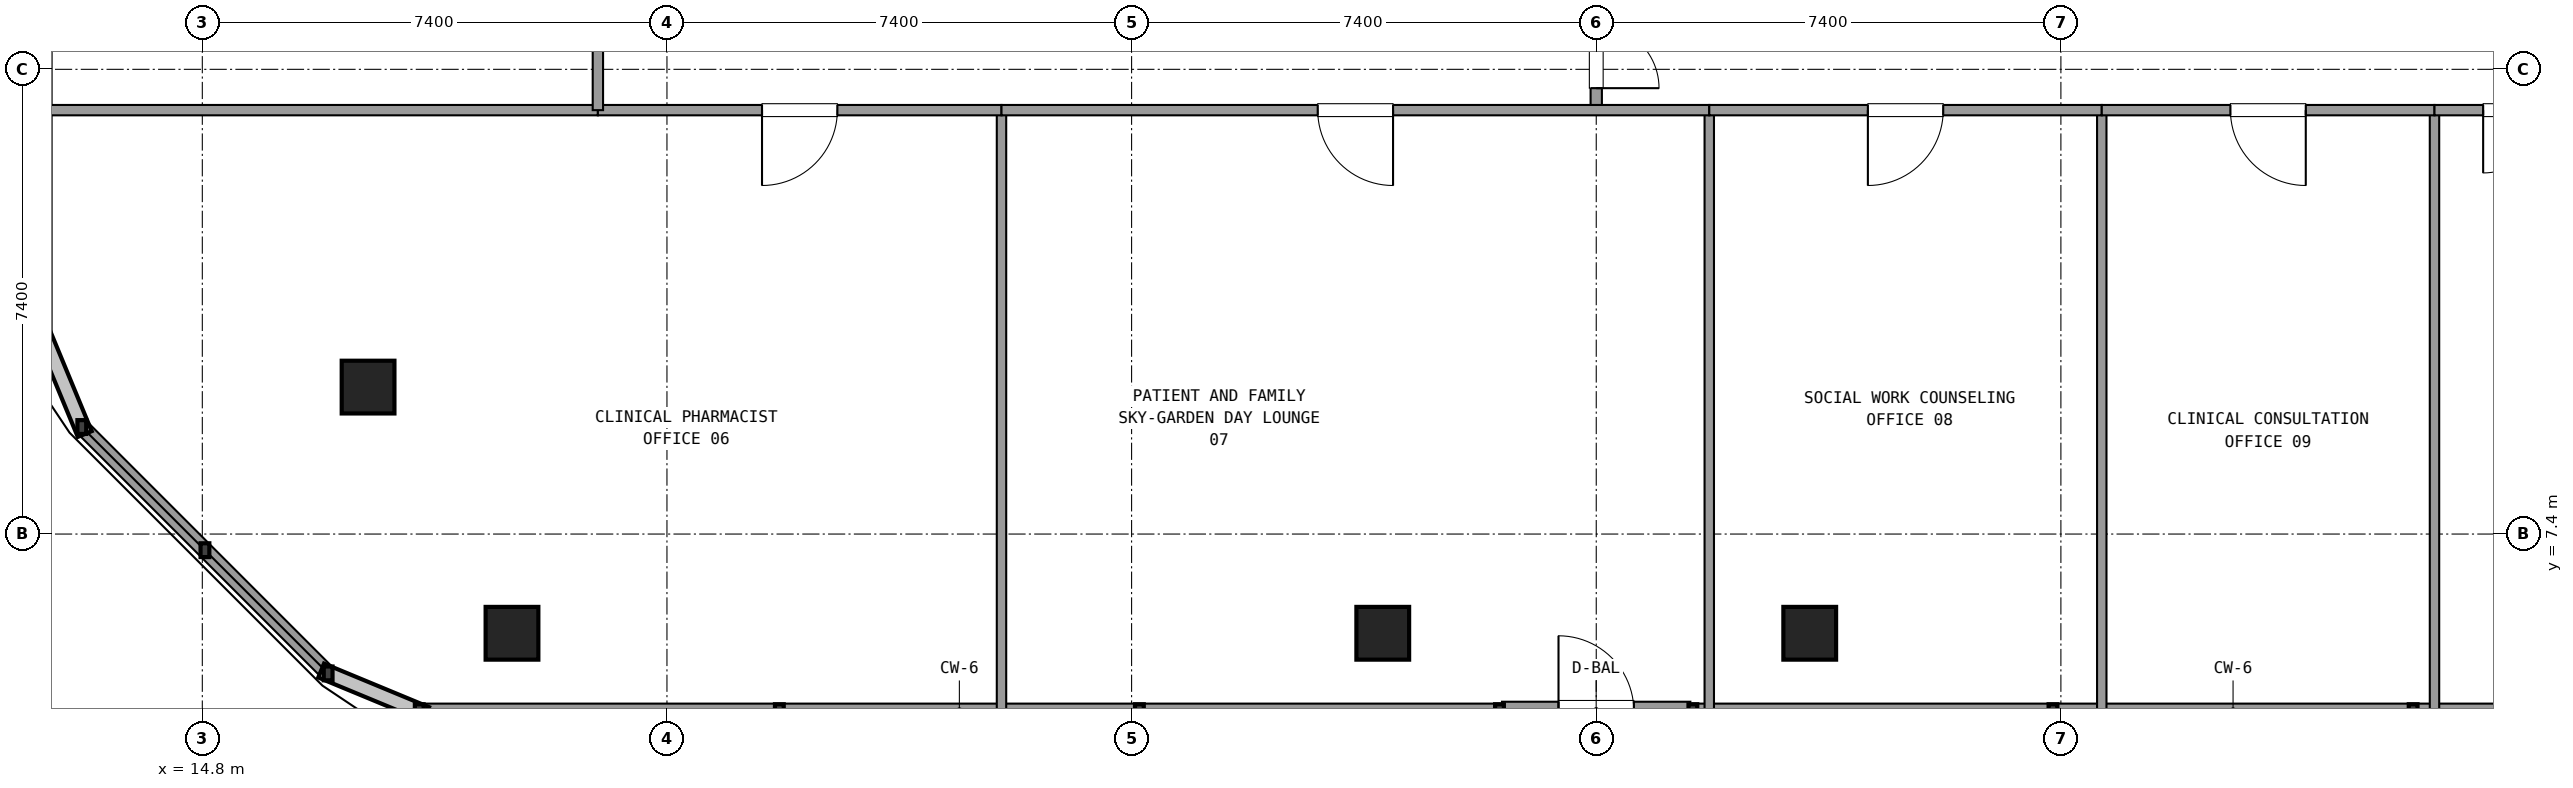
"""IFC4 building model, lengths in metres.
Left out: names, types, materials, properties, quantities, classifications, styles, units other than length and angle.
Written with IfcOpenShell. Run it as: python <this file> out.ifc"""

import sys

from ifc_helpers import new_model, si_unit, direction, frame, frame_2d, origin, origin_2d, place, context, subcontext, project, spatial, rectangle, extrude, element, fill, save


model = new_model("IFC4")
c1 = context("Model", 3, precision=1e-05, world=origin(), true_north=direction((0.0, 1.0)))
c2 = subcontext(c1, "Body", "Model", "MODEL_VIEW")
j1 = project(units=[si_unit("LENGTHUNIT", "METRE"), si_unit("PLANEANGLEUNIT", "RADIAN")], contexts=[c1])
p1 = place(None, origin())
s1 = spatial("IfcSite", under=j1, at=p1, CompositionType="ELEMENT")
p2 = place(p1, origin())
s2 = spatial("IfcBuilding", under=s1, at=p2, CompositionType="ELEMENT")
p3 = place(p2, frame((0.0, 0.0, 250.02)))
s3 = spatial("IfcBuildingStorey", under=s2, at=p3, CompositionType="ELEMENT", Elevation=250.02)
for number, where, z_axis, x_axis in (
    (1, (17.44, 9.74, 0.0), (0.0, 0.0, 1.0), (1.0, 0.0, 0.0)),
    (2, (19.732, 5.82, 0.0), (0.0, 0.0, 1.0), (1.0, 0.0, 0.0)),
    (3, (33.6, 5.82, 0.0), (0.0, 0.0, 1.0), (1.0, 0.0, 0.0)),
    (4, (40.4, 5.82, 0.0), (0.0, 0.0, 1.0), (1.0, 0.0, 0.0)),
):
    element("IfcColumn", number, at=place(p3, frame(where, z_axis=z_axis, x_axis=x_axis)), inside=s3, PredefinedType="COLUMN", context=c2, shape_type="SweptSolid", body=[
        extrude(rectangle(XDim=0.84, YDim=0.84, at=origin_2d()), origin(), (0.0, 0.0, 1.0), 3.6),
    ])
p4 = place(p3, frame((35.499, 4.58, 0.0), z_axis=(0.0, 0.0, 1.0), x_axis=(1.0, 0.0, 0.0)))
e5 = element("IfcWall", 5, at=p4, inside=s3, PredefinedType="SOLIDWALL", context=c2, shape_type="SweptSolid", body=[
    extrude(rectangle(XDim=3.0, YDim=0.3, at=frame_2d((1.5, 0.0))), origin(), (0.0, 0.0, 1.0), 2.69),
])
p5 = place(p4, frame((0.9, 0.0, 0.0)))
e6 = element("IfcOpeningElement", 6, at=p5, cuts=e5, PredefinedType="OPENING", context=c2, shape_type="SweptSolid", body=[
    extrude(rectangle(XDim=1.2, YDim=2.2, at=frame_2d((0.6, 1.1))), frame((0.0, 0.16, 0.0), z_axis=(0.0, -1.0, 0.0), x_axis=(1.0, 0.0, 0.0)), (0.0, 0.0, 1.0), 0.32),
])
p6 = place(p3, frame((18.255, 4.58, 0.0), z_axis=(0.0, 0.0, 1.0), x_axis=(1.0, 0.0, 0.0)))
e7 = element("IfcWall", 7, at=p6, inside=s3, PredefinedType="SOLIDWALL", context=c2, shape_type="SweptSolid", body=[
    extrude(rectangle(XDim=17.204, YDim=0.24, at=frame_2d((8.602, 0.0))), origin(), (0.0, 0.0, 1.0), 0.85),
])
p7 = place(p3, frame((38.539, 4.58, 0.0), z_axis=(0.0, 0.0, 1.0), x_axis=(1.0, 0.0, 0.0)))
e8 = element("IfcWall", 8, at=p7, inside=s3, PredefinedType="SOLIDWALL", context=c2, shape_type="SweptSolid", body=[
    extrude(rectangle(XDim=17.206, YDim=0.24, at=frame_2d((8.603, 0.0))), origin(), (0.0, 0.0, 1.0), 0.85),
])
p8 = place(p3, frame((12.28, 24.36, 0.0), z_axis=(0.0, 0.0, 1.0), x_axis=(0.0, -1.0, 0.0)))
e9 = element("IfcWall", 9, at=p8, inside=s3, PredefinedType="SOLIDWALL", context=c2, shape_type="SweptSolid", body=[
    extrude(rectangle(XDim=13.805, YDim=0.24, at=frame_2d((6.903, 0.0))), origin(), (0.0, 0.0, 1.0), 0.85),
])
p9 = place(p3, frame((12.881, 9.104, 0.0), z_axis=(0.0, 0.0, 1.0), x_axis=(0.707084777957, -0.707128783731, 0.0)))
e10 = element("IfcWall", 10, at=p9, inside=s3, PredefinedType="SOLIDWALL", context=c2, shape_type="SweptSolid", body=[
    extrude(rectangle(XDim=5.548, YDim=0.24, at=frame_2d((2.774, 0.0))), origin(), (0.0, 0.0, 1.0), 0.85),
])
p10 = place(p3, frame((37.0, 14.15, 0.0), z_axis=(0.0, 0.0, 1.0), x_axis=(0.0, 1.0, 0.0)))
e11 = element("IfcWall", 11, at=p10, inside=s3, PredefinedType="PARTITIONING", context=c2, shape_type="SweptSolid", body=[
    extrude(rectangle(XDim=2.7, YDim=0.18, at=frame_2d((1.35, 0.0))), origin(), (0.0, 0.0, 1.0), 2.61),
])
p11 = place(p10, frame((0.35, 0.0, 0.0)))
e12 = element("IfcOpeningElement", 12, at=p11, cuts=e11, PredefinedType="OPENING", context=c2, shape_type="SweptSolid", body=[
    extrude(rectangle(XDim=2.0, YDim=2.2, at=frame_2d((1.0, 1.1))), frame((0.0, 0.1, 0.0), z_axis=(0.0, -1.0, 0.0), x_axis=(1.0, 0.0, 0.0)), (0.0, 0.0, 1.0), 0.2),
])
p12 = place(p3, frame((12.3, 14.15, 0.0), z_axis=(0.0, 0.0, 1.0), x_axis=(1.0, 0.0, 0.0)))
e13 = element("IfcWall", 13, at=p12, inside=s3, PredefinedType="PARTITIONING", context=c2, shape_type="SweptSolid", body=[
    extrude(rectangle(XDim=8.8, YDim=0.165, at=frame_2d((4.4, 0.0))), origin(), (0.0, 0.0, 1.0), 2.61),
])
p13 = place(p3, frame((27.528, 14.15, 0.0), z_axis=(0.0, 0.0, 1.0), x_axis=(0.0, -1.0, 0.0)))
e14 = element("IfcWall", 14, at=p13, inside=s3, PredefinedType="PARTITIONING", context=c2, shape_type="SweptSolid", body=[
    extrude(rectangle(XDim=9.55, YDim=0.15, at=frame_2d((4.775, 0.0))), origin(), (0.0, 0.0, 1.0), 2.61),
])
p14 = place(p3, frame((21.1, 14.15, 0.0), z_axis=(0.0, 0.0, 1.0), x_axis=(1.0, 0.0, 0.0)))
e15 = element("IfcWall", 15, at=p14, inside=s3, PredefinedType="PARTITIONING", context=c2, shape_type="SweptSolid", body=[
    extrude(rectangle(XDim=6.428, YDim=0.165, at=frame_2d((3.214, 0.0))), origin(), (0.0, 0.0, 1.0), 2.61),
])
p15 = place(p14, frame((2.614, 0.0, 0.0)))
e16 = element("IfcOpeningElement", 16, at=p15, cuts=e15, PredefinedType="OPENING", context=c2, shape_type="SweptSolid", body=[
    extrude(rectangle(XDim=1.2, YDim=2.15, at=frame_2d((0.6, 1.075))), frame((0.0, 0.093, 0.0), z_axis=(0.0, -1.0, 0.0), x_axis=(1.0, 0.0, 0.0)), (0.0, 0.0, 1.0), 0.185),
])
p16 = place(p3, frame((38.8, 14.15, 0.0), z_axis=(0.0, 0.0, 1.0), x_axis=(0.0, -1.0, 0.0)))
e17 = element("IfcWall", 17, at=p16, inside=s3, PredefinedType="PARTITIONING", context=c2, shape_type="SweptSolid", body=[
    extrude(rectangle(XDim=9.55, YDim=0.15, at=frame_2d((4.775, 0.0))), origin(), (0.0, 0.0, 1.0), 2.61),
])
p17 = place(p3, frame((27.528, 14.15, 0.0), z_axis=(0.0, 0.0, 1.0), x_axis=(1.0, 0.0, 0.0)))
e18 = element("IfcWall", 18, at=p17, inside=s3, PredefinedType="PARTITIONING", context=c2, shape_type="SweptSolid", body=[
    extrude(rectangle(XDim=11.272, YDim=0.165, at=frame_2d((5.636, 0.0))), origin(), (0.0, 0.0, 1.0), 2.61),
])
p18 = place(p17, frame((5.036, 0.0, 0.0)))
e19 = element("IfcOpeningElement", 19, at=p18, cuts=e18, PredefinedType="OPENING", context=c2, shape_type="SweptSolid", body=[
    extrude(rectangle(XDim=1.2, YDim=2.15, at=frame_2d((0.6, 1.075))), frame((0.0, 0.093, 0.0), z_axis=(0.0, -1.0, 0.0), x_axis=(1.0, 0.0, 0.0)), (0.0, 0.0, 1.0), 0.185),
])
p19 = place(p3, frame((45.051, 14.15, 0.0), z_axis=(0.0, 0.0, 1.0), x_axis=(0.0, -1.0, 0.0)))
e20 = element("IfcWall", 20, at=p19, inside=s3, PredefinedType="PARTITIONING", context=c2, shape_type="SweptSolid", body=[
    extrude(rectangle(XDim=9.55, YDim=0.15, at=frame_2d((4.775, 0.0))), origin(), (0.0, 0.0, 1.0), 2.61),
])
p20 = place(p3, frame((38.8, 14.15, 0.0), z_axis=(0.0, 0.0, 1.0), x_axis=(1.0, 0.0, 0.0)))
e21 = element("IfcWall", 21, at=p20, inside=s3, PredefinedType="PARTITIONING", context=c2, shape_type="SweptSolid", body=[
    extrude(rectangle(XDim=6.251, YDim=0.165, at=frame_2d((3.125, 0.0))), origin(), (0.0, 0.0, 1.0), 2.61),
])
p21 = place(p20, frame((2.526, 0.0, 0.0)))
e22 = element("IfcOpeningElement", 22, at=p21, cuts=e21, PredefinedType="OPENING", context=c2, shape_type="SweptSolid", body=[
    extrude(rectangle(XDim=1.2, YDim=2.15, at=frame_2d((0.6, 1.075))), frame((0.0, 0.093, 0.0), z_axis=(0.0, -1.0, 0.0), x_axis=(1.0, 0.0, 0.0)), (0.0, 0.0, 1.0), 0.185),
])
p22 = place(p3, frame((50.35, 14.15, 0.0), z_axis=(0.0, 0.0, 1.0), x_axis=(0.0, -1.0, 0.0)))
e23 = element("IfcWall", 23, at=p22, inside=s3, PredefinedType="PARTITIONING", context=c2, shape_type="SweptSolid", body=[
    extrude(rectangle(XDim=9.55, YDim=0.15, at=frame_2d((4.775, 0.0))), origin(), (0.0, 0.0, 1.0), 2.61),
])
p23 = place(p3, frame((45.051, 14.15, 0.0), z_axis=(0.0, 0.0, 1.0), x_axis=(1.0, 0.0, 0.0)))
e24 = element("IfcWall", 24, at=p23, inside=s3, PredefinedType="PARTITIONING", context=c2, shape_type="SweptSolid", body=[
    extrude(rectangle(XDim=5.299, YDim=0.165, at=frame_2d((2.649, 0.0))), origin(), (0.0, 0.0, 1.0), 2.61),
])
p24 = place(p23, frame((2.049, 0.0, 0.0)))
e25 = element("IfcOpeningElement", 25, at=p24, cuts=e24, PredefinedType="OPENING", context=c2, shape_type="SweptSolid", body=[
    extrude(rectangle(XDim=1.2, YDim=2.15, at=frame_2d((0.6, 1.075))), frame((0.0, 0.093, 0.0), z_axis=(0.0, -1.0, 0.0), x_axis=(1.0, 0.0, 0.0)), (0.0, 0.0, 1.0), 0.185),
])
p25 = place(p3, frame((50.35, 14.15, 0.0), z_axis=(0.0, 0.0, 1.0), x_axis=(1.0, 0.0, 0.0)))
e26 = element("IfcWall", 26, at=p25, inside=s3, PredefinedType="PARTITIONING", context=c2, shape_type="SweptSolid", body=[
    extrude(rectangle(XDim=2.55, YDim=0.165, at=frame_2d((1.275, 0.0))), origin(), (0.0, 0.0, 1.0), 2.61),
])
p26 = place(p25, frame((0.775, 0.0, 0.0)))
e27 = element("IfcOpeningElement", 27, at=p26, cuts=e26, PredefinedType="OPENING", context=c2, shape_type="SweptSolid", body=[
    extrude(rectangle(XDim=1.0, YDim=2.15, at=frame_2d((0.5, 1.075))), frame((0.0, 0.093, 0.0), z_axis=(0.0, -1.0, 0.0), x_axis=(1.0, 0.0, 0.0)), (0.0, 0.0, 1.0), 0.185),
])
p27 = place(p3, frame((21.1, 14.15, 0.0), z_axis=(0.0, 0.0, 1.0), x_axis=(0.0, 1.0, 0.0)))
e28 = element("IfcWall", 28, at=p27, inside=s3, PredefinedType="PARTITIONING", context=c2, shape_type="SweptSolid", body=[
    extrude(rectangle(XDim=5.17, YDim=0.165, at=frame_2d((2.585, 0.0))), origin(), (0.0, 0.0, 1.0), 2.61),
])
p28 = place(p27, frame((1.985, 0.0, 0.0)))
e29 = element("IfcOpeningElement", 29, at=p28, cuts=e28, PredefinedType="OPENING", context=c2, shape_type="SweptSolid", body=[
    extrude(rectangle(XDim=1.2, YDim=2.15, at=frame_2d((0.6, 1.075))), frame((0.0, 0.093, 0.0), z_axis=(0.0, -1.0, 0.0), x_axis=(1.0, 0.0, 0.0)), (0.0, 0.0, 1.0), 0.185),
])
p29 = place(p11, frame((2.0, 0.0, 0.0), z_axis=(0.0, 0.0, 1.0), x_axis=(-1.0, 0.0, 0.0)))
e30 = element("IfcDoor", 30, at=p29, inside=s3, OperationType="DOUBLE_DOOR_SINGLE_SWING", PredefinedType="DOOR", context=c2, shape_type="SweptSolid", body=[
    extrude(rectangle(XDim=2.0, YDim=2.2, at=frame_2d((1.0, 1.1))), frame((0.0, 0.025, 0.0), z_axis=(0.0, -1.0, 0.0), x_axis=(1.0, 0.0, 0.0)), (0.0, 0.0, 1.0), 0.05),
])
fill(e12, e30)
p30 = place(p15, frame((1.2, 0.0, 0.0), z_axis=(0.0, 0.0, 1.0), x_axis=(-1.0, 0.0, 0.0)))
e31 = element("IfcDoor", 31, at=p30, inside=s3, OperationType="SINGLE_SWING_LEFT", PredefinedType="DOOR", context=c2, shape_type="SweptSolid", body=[
    extrude(rectangle(XDim=1.2, YDim=2.15, at=frame_2d((0.6, 1.075))), frame((0.0, 0.025, 0.0), z_axis=(0.0, -1.0, 0.0), x_axis=(1.0, 0.0, 0.0)), (0.0, 0.0, 1.0), 0.05),
])
fill(e16, e31)
p31 = place(p18, frame((1.2, 0.0, 0.0), z_axis=(0.0, 0.0, 1.0), x_axis=(-1.0, 0.0, 0.0)))
e32 = element("IfcDoor", 32, at=p31, inside=s3, OperationType="SINGLE_SWING_RIGHT", PredefinedType="DOOR", context=c2, shape_type="SweptSolid", body=[
    extrude(rectangle(XDim=1.2, YDim=2.15, at=frame_2d((0.6, 1.075))), frame((0.0, 0.025, 0.0), z_axis=(0.0, -1.0, 0.0), x_axis=(1.0, 0.0, 0.0)), (0.0, 0.0, 1.0), 0.05),
])
fill(e19, e32)
p32 = place(p21, frame((1.2, 0.0, 0.0), z_axis=(0.0, 0.0, 1.0), x_axis=(-1.0, 0.0, 0.0)))
e33 = element("IfcDoor", 33, at=p32, inside=s3, OperationType="SINGLE_SWING_LEFT", PredefinedType="DOOR", context=c2, shape_type="SweptSolid", body=[
    extrude(rectangle(XDim=1.2, YDim=2.15, at=frame_2d((0.6, 1.075))), frame((0.0, 0.025, 0.0), z_axis=(0.0, -1.0, 0.0), x_axis=(1.0, 0.0, 0.0)), (0.0, 0.0, 1.0), 0.05),
])
fill(e22, e33)
p33 = place(p24, frame((1.2, 0.0, 0.0), z_axis=(0.0, 0.0, 1.0), x_axis=(-1.0, 0.0, 0.0)))
e34 = element("IfcDoor", 34, at=p33, inside=s3, OperationType="SINGLE_SWING_RIGHT", PredefinedType="DOOR", context=c2, shape_type="SweptSolid", body=[
    extrude(rectangle(XDim=1.2, YDim=2.15, at=frame_2d((0.6, 1.075))), frame((0.0, 0.025, 0.0), z_axis=(0.0, -1.0, 0.0), x_axis=(1.0, 0.0, 0.0)), (0.0, 0.0, 1.0), 0.05),
])
fill(e25, e34)
p34 = place(p26, frame((1.0, 0.0, 0.0), z_axis=(0.0, 0.0, 1.0), x_axis=(-1.0, 0.0, 0.0)))
e35 = element("IfcDoor", 35, at=p34, inside=s3, OperationType="SINGLE_SWING_LEFT", PredefinedType="DOOR", context=c2, shape_type="SweptSolid", body=[
    extrude(rectangle(XDim=1.0, YDim=2.15, at=frame_2d((0.5, 1.075))), frame((0.0, 0.025, 0.0), z_axis=(0.0, -1.0, 0.0), x_axis=(1.0, 0.0, 0.0)), (0.0, 0.0, 1.0), 0.05),
])
fill(e27, e35)
save(model, sys.argv[1])
